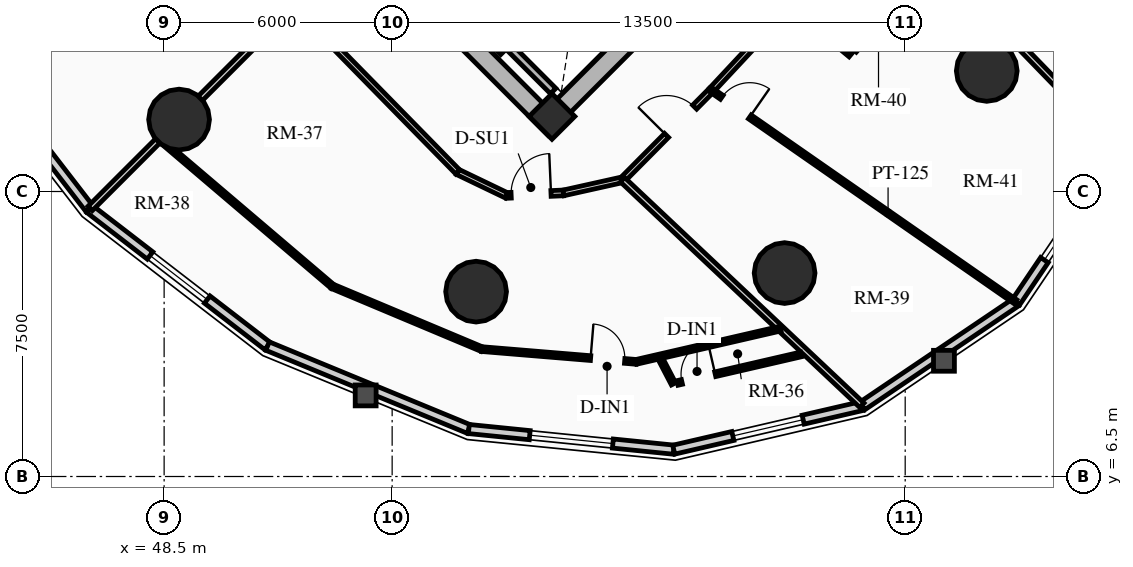
"""IFC4 building model, lengths in metres.
Left out: names, types, materials, properties, quantities, classifications, styles, units other than length and angle.
Written with IfcOpenShell. Run it as: python <this file> out.ifc"""

import sys

from ifc_helpers import new_model, si_unit, direction, frame, frame_2d, origin, origin_2d, place, context, subcontext, project, spatial, rectangle, circle, extrude, source, transform, mapped, element, fill, save


model = new_model("IFC4")
c1 = context("Model", 3, precision=1e-05, world=origin(), true_north=direction((0.0, 1.0)))
c2 = subcontext(c1, "Body", "Model", "MODEL_VIEW")
j1 = project(units=[si_unit("LENGTHUNIT", "METRE"), si_unit("PLANEANGLEUNIT", "RADIAN")], contexts=[c1])
p1 = place(None, origin())
s1 = spatial("IfcSite", under=j1, at=p1, CompositionType="ELEMENT")
p2 = place(p1, origin())
s2 = spatial("IfcBuilding", under=s1, at=p2, CompositionType="ELEMENT")
p3 = place(p2, frame((0.0, 0.0, 42.37)))
s3 = spatial("IfcBuildingStorey", under=s2, at=p3, CompositionType="ELEMENT", Elevation=42.37)
p4 = place(p3, frame((58.773, 15.661, 0.0), z_axis=(0.0, 0.0, 1.0), x_axis=(-0.707106781187, 0.707106781187, 0.0)))
e1 = element("IfcWall", 1, at=p4, inside=s3, PredefinedType="SHEAR", context=c2, shape_type="SweptSolid", body=[
    extrude(rectangle(XDim=14.3, YDim=0.5, at=frame_2d((7.15, 0.0))), origin(), (0.0, 0.0, 1.0), 2.91),
])
p5 = place(p3, frame((58.596, 15.838, 0.0), z_axis=(0.0, 0.0, 1.0), x_axis=(0.707106781187, 0.707106781187, 0.0)))
e2 = element("IfcWall", 2, at=p5, inside=s3, PredefinedType="SHEAR", context=c2, shape_type="SweptSolid", body=[
    extrude(rectangle(XDim=10.7, YDim=0.5, at=frame_2d((5.35, 0.0))), origin(), (0.0, 0.0, 1.0), 2.91),
])
m1 = source(origin(), c2, "Body", "SweptSolid", [
    extrude(rectangle(XDim=1.5, YDim=2.02, at=frame_2d((0.75, 1.01))), frame((0.0, 0.26, 0.0), z_axis=(0.0, -1.0, 0.0), x_axis=(1.0, 0.0, 0.0)), (0.0, 0.0, 1.0), 0.52),
])
p6 = place(p5, frame((5.45, 0.0, 0.0)))
e3 = element("IfcOpeningElement", 3, at=p6, cuts=e2, PredefinedType="OPENING", context=c2, shape_type="MappedRepresentation", body=[
    mapped(m1, transform((0.0, 0.0, 0.0), x_axis=(1.0, 0.0, 0.0), y_axis=(0.0, 1.0, 0.0), z_axis=(0.0, 0.0, 1.0), scale=1.0)),
])
p7 = place(p3, frame((58.706, 15.976, 0.0), z_axis=(0.0, 0.0, 1.0), x_axis=(0.707106781187, 0.707106781187, 0.0)))
e4 = element("IfcColumn", 4, at=p7, inside=s3, PredefinedType="COLUMN", context=c2, shape_type="SweptSolid", body=[
    extrude(rectangle(XDim=0.85, YDim=0.85, at=origin_2d()), origin(), (0.0, 0.0, 1.0), 2.91),
])
for number, where, z_axis, x_axis in (
    (5, (48.893, 15.893, 0.0), (0.0, 0.0, 1.0), (1.0, 0.0, 0.0)),
    (6, (56.709, 11.365, 0.0), (0.0, 0.0, 1.0), (1.0, 0.0, 0.0)),
    (7, (64.827, 11.854, 0.0), (0.0, 0.0, 1.0), (1.0, 0.0, 0.0)),
    (8, (70.146, 17.173, 0.0), (0.0, 0.0, 1.0), (1.0, 0.0, 0.0)),
):
    element("IfcColumn", number, at=place(p3, frame(where, z_axis=z_axis, x_axis=x_axis)), inside=s3, PredefinedType="USERDEFINED", context=c2, shape_type="SweptSolid", body=[
        extrude(circle(Radius=0.8, at=origin_2d()), origin(), (0.0, 0.0, 1.0), 2.91),
    ])
p8 = place(p3, frame((46.541, 13.541, 0.0), z_axis=(0.0, 0.0, 1.0), x_axis=(-0.610494906082, 0.792020182601, 0.0)))
e9 = element("IfcWall", 9, at=p8, inside=s3, PredefinedType="SOLIDWALL", context=c2, shape_type="SweptSolid", body=[
    extrude(rectangle(XDim=5.911, YDim=0.24, at=frame_2d((2.956, 0.0))), origin(), (0.0, 0.0, 1.0), 2.073),
])
p9 = place(p3, frame((51.222, 9.932, 0.0), z_axis=(0.0, 0.0, 1.0), x_axis=(-0.792020182601, 0.610494906082, 0.0)))
e10 = element("IfcWall", 10, at=p9, inside=s3, PredefinedType="SOLIDWALL", context=c2, shape_type="SweptSolid", body=[
    extrude(rectangle(XDim=5.911, YDim=0.24, at=frame_2d((2.956, 0.0))), origin(), (0.0, 0.0, 1.0), 2.073),
])
m2 = source(origin(), c2, "Body", "SweptSolid", [
    extrude(rectangle(XDim=1.9, YDim=1.35, at=frame_2d((0.95, 0.675))), frame((0.0, 0.13, 0.0), z_axis=(0.0, -1.0, 0.0), x_axis=(1.0, 0.0, 0.0)), (0.0, 0.0, 1.0), 0.26),
])
p10 = place(p9, frame((2.005, 0.0, 0.65)))
e11 = element("IfcOpeningElement", 11, at=p10, cuts=e10, PredefinedType="OPENING", context=c2, shape_type="MappedRepresentation", body=[
    mapped(m2, transform((0.0, 0.0, 0.0), x_axis=(1.0, 0.0, 0.0), y_axis=(0.0, 1.0, 0.0), z_axis=(0.0, 0.0, 1.0), scale=1.0)),
])
p11 = place(p3, frame((56.518, 7.749, 0.0), z_axis=(0.0, 0.0, 1.0), x_axis=(-0.924542988536, 0.381077764176, 0.0)))
e12 = element("IfcWall", 12, at=p11, inside=s3, PredefinedType="SOLIDWALL", context=c2, shape_type="SweptSolid", body=[
    extrude(rectangle(XDim=5.728, YDim=0.24, at=frame_2d((2.864, 0.0))), origin(), (0.0, 0.0, 1.0), 2.073),
])
p12 = place(p3, frame((61.91, 7.206, 0.0), z_axis=(0.0, 0.0, 1.0), x_axis=(-0.994968263437, 0.100190592135, 0.0)))
e13 = element("IfcWall", 13, at=p12, inside=s3, PredefinedType="SOLIDWALL", context=c2, shape_type="SweptSolid", body=[
    extrude(rectangle(XDim=5.419, YDim=0.24, at=frame_2d((2.71, 0.0))), origin(), (0.0, 0.0, 1.0), 2.073),
])
m3 = source(origin(), c2, "Body", "SweptSolid", [
    extrude(rectangle(XDim=2.2, YDim=1.35, at=frame_2d((1.1, 0.675))), frame((0.0, 0.13, 0.0), z_axis=(0.0, -1.0, 0.0), x_axis=(1.0, 0.0, 0.0)), (0.0, 0.0, 1.0), 0.26),
])
p13 = place(p12, frame((1.61, 0.0, 0.65)))
e14 = element("IfcOpeningElement", 14, at=p13, cuts=e13, PredefinedType="OPENING", context=c2, shape_type="MappedRepresentation", body=[
    mapped(m3, transform((0.0, 0.0, 0.0), x_axis=(1.0, 0.0, 0.0), y_axis=(0.0, 1.0, 0.0), z_axis=(0.0, 0.0, 1.0), scale=1.0)),
])
p14 = place(p3, frame((66.871, 8.356, 0.0), z_axis=(0.0, 0.0, 1.0), x_axis=(-0.974167686491, -0.22582585901, 0.0)))
e15 = element("IfcWall", 15, at=p14, inside=s3, PredefinedType="SOLIDWALL", context=c2, shape_type="SweptSolid", body=[
    extrude(rectangle(XDim=5.092, YDim=0.24, at=frame_2d((2.546, 0.0))), origin(), (0.0, 0.0, 1.0), 2.073),
])
p15 = place(p14, frame((1.596, 0.0, 0.65)))
e16 = element("IfcOpeningElement", 16, at=p15, cuts=e15, PredefinedType="OPENING", context=c2, shape_type="MappedRepresentation", body=[
    mapped(m2, transform((0.0, 0.0, 0.0), x_axis=(1.0, 0.0, 0.0), y_axis=(0.0, 1.0, 0.0), z_axis=(0.0, 0.0, 1.0), scale=1.0)),
])
p16 = place(p3, frame((70.914, 11.086, 0.0), z_axis=(0.0, 0.0, 1.0), x_axis=(-0.828748297084, -0.559621532896, 0.0)))
e17 = element("IfcWall", 17, at=p16, inside=s3, PredefinedType="SOLIDWALL", context=c2, shape_type="SweptSolid", body=[
    extrude(rectangle(XDim=4.879, YDim=0.24, at=frame_2d((2.439, 0.0))), origin(), (0.0, 0.0, 1.0), 2.073),
])
p17 = place(p3, frame((73.644, 15.129, 0.0), z_axis=(0.0, 0.0, 1.0), x_axis=(-0.559621532896, -0.828748297084, 0.0)))
e18 = element("IfcWall", 18, at=p17, inside=s3, PredefinedType="SOLIDWALL", context=c2, shape_type="SweptSolid", body=[
    extrude(rectangle(XDim=4.879, YDim=0.24, at=frame_2d((2.439, 0.0))), origin(), (0.0, 0.0, 1.0), 2.073),
])
p18 = place(p17, frame((1.339, 0.0, 0.65)))
e19 = element("IfcOpeningElement", 19, at=p18, cuts=e18, PredefinedType="OPENING", context=c2, shape_type="MappedRepresentation", body=[
    mapped(m3, transform((0.0, 0.0, 0.0), x_axis=(1.0, 0.0, 0.0), y_axis=(0.0, 1.0, 0.0), z_axis=(0.0, 0.0, 1.0), scale=1.0)),
])
p19 = place(p3, frame((57.284, 17.673, 0.0), z_axis=(0.0, 0.0, 1.0), x_axis=(0.707147878904, 0.70706568108, 0.0)))
e20 = element("IfcWall", 20, at=p19, inside=s3, PredefinedType="SHEAR", context=c2, shape_type="SweptSolid", body=[
    extrude(rectangle(XDim=2.97, YDim=0.2, at=frame_2d((1.485, 0.0))), origin(), (0.0, 0.0, 1.0), 2.91),
])
p20 = place(p3, frame((58.737, 16.644, 0.0), z_axis=(0.0, 0.0, 1.0), x_axis=(-0.707032117043, 0.707181437447, 0.0)))
e21 = element("IfcWall", 21, at=p20, inside=s3, PredefinedType="SHEAR", context=c2, shape_type="SweptSolid", body=[
    extrude(rectangle(XDim=1.635, YDim=0.2, at=frame_2d((0.817, 0.0))), origin(), (0.0, 0.0, 1.0), 2.91),
])
p21 = place(p3, frame((51.914, 18.914, 0.0), z_axis=(0.0, 0.0, 1.0), x_axis=(0.699999313799, -0.714143515465, 0.0)))
e22 = element("IfcWall", 22, at=p21, inside=s3, PredefinedType="PARTITIONING", context=c2, shape_type="SweptSolid", body=[
    extrude(rectangle(XDim=6.162, YDim=0.15, at=frame_2d((3.081, 0.0))), origin(), (0.0, 0.0, 1.0), 2.159),
])
p22 = place(p3, frame((56.227, 14.513, 0.0), z_axis=(0.0, 0.0, 1.0), x_axis=(0.901477579283, -0.432825801044, 0.0)))
e23 = element("IfcWall", 23, at=p22, inside=s3, PredefinedType="PARTITIONING", context=c2, shape_type="SweptSolid", body=[
    extrude(rectangle(XDim=1.424, YDim=0.15, at=frame_2d((0.712, 0.0))), origin(), (0.0, 0.0, 1.0), 2.205),
])
p23 = place(p3, frame((57.511, 13.897, 0.0), z_axis=(0.0, 0.0, 1.0), x_axis=(0.999024538494, 0.044158481476, 0.0)))
e24 = element("IfcWall", 24, at=p23, inside=s3, PredefinedType="PARTITIONING", context=c2, shape_type="SweptSolid", body=[
    extrude(rectangle(XDim=1.498, YDim=0.15, at=frame_2d((0.749, 0.0))), origin(), (0.0, 0.0, 1.0), 2.159),
])
m4 = source(origin(), c2, "Body", "SweptSolid", [
    extrude(rectangle(XDim=1.05, YDim=2.015, at=frame_2d((0.525, 1.007))), frame((0.0, 0.085, 0.0), z_axis=(0.0, -1.0, 0.0), x_axis=(1.0, 0.0, 0.0)), (0.0, 0.0, 1.0), 0.17),
])
p24 = place(p23, frame((0.12, 0.0, 0.0)))
e25 = element("IfcOpeningElement", 25, at=p24, cuts=e24, PredefinedType="OPENING", context=c2, shape_type="MappedRepresentation", body=[
    mapped(m4, transform((0.0, 0.0, 0.0), x_axis=(1.0, 0.0, 0.0), y_axis=(0.0, 1.0, 0.0), z_axis=(0.0, 0.0, 1.0), scale=1.0)),
])
p25 = place(p3, frame((59.008, 13.963, 0.0), z_axis=(0.0, 0.0, 1.0), x_axis=(0.976020856791, 0.21767702476, 0.0)))
e26 = element("IfcWall", 26, at=p25, inside=s3, PredefinedType="PARTITIONING", context=c2, shape_type="SweptSolid", body=[
    extrude(rectangle(XDim=1.593, YDim=0.15, at=frame_2d((0.796, 0.0))), origin(), (0.0, 0.0, 1.0), 2.205),
])
p26 = place(p3, frame((60.562, 14.31, 0.0), z_axis=(0.0, 0.0, 1.0), x_axis=(0.704566236161, 0.709638230975, 0.0)))
e27 = element("IfcWall", 27, at=p26, inside=s3, PredefinedType="PARTITIONING", context=c2, shape_type="SweptSolid", body=[
    extrude(rectangle(XDim=3.321, YDim=0.15, at=frame_2d((1.661, 0.0))), origin(), (0.0, 0.0, 1.0), 2.159),
])
p27 = place(p26, frame((1.643, 0.0, 0.0)))
e28 = element("IfcOpeningElement", 28, at=p27, cuts=e27, PredefinedType="OPENING", context=c2, shape_type="MappedRepresentation", body=[
    mapped(m4, transform((0.0, 0.0, 0.0), x_axis=(1.0, 0.0, 0.0), y_axis=(0.0, 1.0, 0.0), z_axis=(0.0, 0.0, 1.0), scale=1.0)),
])
p28 = place(p3, frame((62.903, 16.667, 0.0), z_axis=(0.0, 0.0, 1.0), x_axis=(0.682371947497, 0.731005147225, 0.0)))
e29 = element("IfcWall", 29, at=p28, inside=s3, PredefinedType="PARTITIONING", context=c2, shape_type="SweptSolid", body=[
    extrude(rectangle(XDim=6.642, YDim=0.15, at=frame_2d((3.321, 0.0))), origin(), (0.0, 0.0, 1.0), 2.159),
])
p29 = place(p3, frame((51.914, 18.914, 0.0), z_axis=(0.0, 0.0, 1.0), x_axis=(-0.707106781187, -0.707106781187, 0.0)))
e30 = element("IfcWall", 30, at=p29, inside=s3, PredefinedType="PARTITIONING", context=c2, shape_type="SweptSolid", body=[
    extrude(rectangle(XDim=7.579, YDim=0.16, at=frame_2d((3.79, 0.0))), origin(), (0.0, 0.0, 1.0), 2.073),
])
p30 = place(p3, frame((60.562, 14.31, 0.0), z_axis=(0.0, 0.0, 1.0), x_axis=(0.727781661561, -0.685808904211, 0.0)))
e31 = element("IfcWall", 31, at=p30, inside=s3, PredefinedType="PARTITIONING", context=c2, shape_type="SweptSolid", body=[
    extrude(rectangle(XDim=8.655, YDim=0.16, at=frame_2d((4.328, 0.0))), origin(), (0.0, 0.0, 1.0), 2.073),
])
p31 = place(p3, frame((67.435, 21.521, 0.0), z_axis=(0.0, 0.0, 1.0), x_axis=(0.6962628802, -0.717786877601, 0.0)))
e32 = element("IfcWall", 32, at=p31, inside=s3, PredefinedType="PARTITIONING", context=c2, shape_type="SweptSolid", body=[
    extrude(rectangle(XDim=8.893, YDim=0.16, at=frame_2d((4.446, 0.0))), origin(), (0.0, 0.0, 1.0), 2.073),
])
p32 = place(p3, frame((48.377, 15.377, 0.0), z_axis=(0.0, 0.0, 1.0), x_axis=(0.761505943152, -0.648157927163, 0.0)))
e33 = element("IfcWall", 33, at=p32, inside=s3, PredefinedType="PARTITIONING", context=c2, shape_type="SweptSolid", body=[
    extrude(rectangle(XDim=5.979, YDim=0.125, at=frame_2d((2.99, 0.0))), origin(), (0.0, 0.0, 1.0), 2.635),
])
p33 = place(p3, frame((52.93, 11.501, 0.0), z_axis=(0.0, 0.0, 1.0), x_axis=(0.922051248037, -0.387067818338, 0.0)))
e34 = element("IfcWall", 34, at=p33, inside=s3, PredefinedType="PARTITIONING", context=c2, shape_type="SweptSolid", body=[
    extrude(rectangle(XDim=4.26, YDim=0.125, at=frame_2d((2.13, 0.0))), origin(), (0.0, 0.0, 1.0), 2.159),
])
p34 = place(p3, frame((56.858, 9.852, 0.0), z_axis=(0.0, 0.0, 1.0), x_axis=(0.996604967548, -0.082331881181, 0.0)))
e35 = element("IfcWall", 35, at=p34, inside=s3, PredefinedType="PARTITIONING", context=c2, shape_type="SweptSolid", body=[
    extrude(rectangle(XDim=4.077, YDim=0.125, at=frame_2d((2.039, 0.0))), origin(), (0.0, 0.0, 1.0), 2.635),
])
m5 = source(origin(), c2, "Body", "SweptSolid", [
    extrude(rectangle(XDim=0.9, YDim=2.005, at=frame_2d((0.45, 1.002))), frame((0.0, 0.073, 0.0), z_axis=(0.0, -1.0, 0.0), x_axis=(1.0, 0.0, 0.0)), (0.0, 0.0, 1.0), 0.145),
])
p35 = place(p34, frame((2.874, 0.0, 0.0)))
e36 = element("IfcOpeningElement", 36, at=p35, cuts=e35, PredefinedType="OPENING", context=c2, shape_type="MappedRepresentation", body=[
    mapped(m5, transform((0.0, 0.0, 0.0), x_axis=(1.0, 0.0, 0.0), y_axis=(0.0, 1.0, 0.0), z_axis=(0.0, 0.0, 1.0), scale=1.0)),
])
p36 = place(p3, frame((60.921, 9.517, 0.0), z_axis=(0.0, 0.0, 1.0), x_axis=(0.974453436038, 0.224589627973, 0.0)))
e37 = element("IfcWall", 37, at=p36, inside=s3, PredefinedType="PARTITIONING", context=c2, shape_type="SweptSolid", body=[
    extrude(rectangle(XDim=3.898, YDim=0.125, at=frame_2d((1.949, 0.0))), origin(), (0.0, 0.0, 1.0), 2.205),
])
p37 = place(p3, frame((61.564, 9.589, 0.0), z_axis=(0.0, 0.0, 1.0), x_axis=(0.462168536246, -0.886792108729, 0.0)))
e38 = element("IfcWall", 38, at=p37, inside=s3, PredefinedType="PARTITIONING", context=c2, shape_type="SweptSolid", body=[
    extrude(rectangle(XDim=0.735, YDim=0.125, at=frame_2d((0.367, 0.0))), origin(), (0.0, 0.0, 1.0), 2.635),
])
p38 = place(p3, frame((62.008, 8.962, 0.0), z_axis=(0.0, 0.0, 1.0), x_axis=(0.974365294983, 0.224971713626, 0.0)))
e39 = element("IfcWall", 39, at=p38, inside=s3, PredefinedType="PARTITIONING", context=c2, shape_type="SweptSolid", body=[
    extrude(rectangle(XDim=3.337, YDim=0.125, at=frame_2d((1.668, 0.0))), origin(), (0.0, 0.0, 1.0), 2.635),
])
p39 = place(p38, frame((0.12, 0.0, 0.0)))
e40 = element("IfcOpeningElement", 40, at=p39, cuts=e39, PredefinedType="OPENING", context=c2, shape_type="MappedRepresentation", body=[
    mapped(m5, transform((0.0, 0.0, 0.0), x_axis=(1.0, 0.0, 0.0), y_axis=(0.0, 1.0, 0.0), z_axis=(0.0, 0.0, 1.0), scale=1.0)),
])
p40 = place(p3, frame((62.903, 16.667, 0.0), z_axis=(0.0, 0.0, 1.0), x_axis=(0.820761665638, -0.571270766116, 0.0)))
e41 = element("IfcWall", 41, at=p40, inside=s3, PredefinedType="PARTITIONING", context=c2, shape_type="SweptSolid", body=[
    extrude(rectangle(XDim=9.743, YDim=0.125, at=frame_2d((4.872, 0.0))), origin(), (0.0, 0.0, 1.0), 2.073),
])
p41 = place(p40, frame((0.33, 0.0, 0.0)))
e42 = element("IfcOpeningElement", 42, at=p41, cuts=e41, PredefinedType="OPENING", context=c2, shape_type="MappedRepresentation", body=[
    mapped(m5, transform((0.0, 0.0, 0.0), x_axis=(1.0, 0.0, 0.0), y_axis=(0.0, 1.0, 0.0), z_axis=(0.0, 0.0, 1.0), scale=1.0)),
])
p42 = place(p3, frame((65.202, 18.721, 0.0), z_axis=(0.0, 0.0, 1.0), x_axis=(0.769814202386, -0.638268042287, 0.0)))
e43 = element("IfcWall", 43, at=p42, inside=s3, PredefinedType="PARTITIONING", context=c2, shape_type="SweptSolid", body=[
    extrude(rectangle(XDim=1.769, YDim=0.125, at=frame_2d((0.884, 0.0))), origin(), (0.0, 0.0, 1.0), 2.635),
])
m6 = source(origin(), c2, "Body", "SweptSolid", [
    extrude(rectangle(XDim=1.9, YDim=1.35, at=frame_2d((0.95, 0.675))), frame((0.0, 0.03, 0.0), z_axis=(0.0, -1.0, 0.0), x_axis=(1.0, 0.0, 0.0)), (0.0, 0.0, 1.0), 0.06),
])
p43 = place(p10, origin())
e44 = element("IfcWindow", 44, at=p43, inside=s3, PartitioningType="DOUBLE_PANEL_VERTICAL", PredefinedType="WINDOW", context=c2, shape_type="MappedRepresentation", body=[
    mapped(m6, transform((0.0, 0.0, 0.0), x_axis=(1.0, 0.0, 0.0), y_axis=(0.0, 1.0, 0.0), z_axis=(0.0, 0.0, 1.0), scale=1.0)),
])
fill(e11, e44)
m7 = source(origin(), c2, "Body", "SweptSolid", [
    extrude(rectangle(XDim=2.2, YDim=1.35, at=frame_2d((1.1, 0.675))), frame((0.0, 0.03, 0.0), z_axis=(0.0, -1.0, 0.0), x_axis=(1.0, 0.0, 0.0)), (0.0, 0.0, 1.0), 0.06),
])
p44 = place(p13, origin())
e45 = element("IfcWindow", 45, at=p44, inside=s3, PartitioningType="DOUBLE_PANEL_VERTICAL", PredefinedType="WINDOW", context=c2, shape_type="MappedRepresentation", body=[
    mapped(m7, transform((0.0, 0.0, 0.0), x_axis=(1.0, 0.0, 0.0), y_axis=(0.0, 1.0, 0.0), z_axis=(0.0, 0.0, 1.0), scale=1.0)),
])
fill(e14, e45)
p45 = place(p15, origin())
e46 = element("IfcWindow", 46, at=p45, inside=s3, PartitioningType="DOUBLE_PANEL_VERTICAL", PredefinedType="WINDOW", context=c2, shape_type="MappedRepresentation", body=[
    mapped(m6, transform((0.0, 0.0, 0.0), x_axis=(1.0, 0.0, 0.0), y_axis=(0.0, 1.0, 0.0), z_axis=(0.0, 0.0, 1.0), scale=1.0)),
])
fill(e16, e46)
p46 = place(p18, origin())
e47 = element("IfcWindow", 47, at=p46, inside=s3, PartitioningType="DOUBLE_PANEL_VERTICAL", PredefinedType="WINDOW", context=c2, shape_type="MappedRepresentation", body=[
    mapped(m7, transform((0.0, 0.0, 0.0), x_axis=(1.0, 0.0, 0.0), y_axis=(0.0, 1.0, 0.0), z_axis=(0.0, 0.0, 1.0), scale=1.0)),
])
fill(e19, e47)
m8 = source(origin(), c2, "Body", "SweptSolid", [
    extrude(rectangle(XDim=1.05, YDim=2.015, at=frame_2d((0.525, 1.007))), frame((0.0, 0.025, 0.0), z_axis=(0.0, -1.0, 0.0), x_axis=(1.0, 0.0, 0.0)), (0.0, 0.0, 1.0), 0.05),
])
p47 = place(p24, origin())
e48 = element("IfcDoor", 48, at=p47, inside=s3, OperationType="SINGLE_SWING_RIGHT", PredefinedType="DOOR", context=c2, shape_type="MappedRepresentation", body=[
    mapped(m8, transform((0.0, 0.0, 0.0), x_axis=(1.0, 0.0, 0.0), y_axis=(0.0, 1.0, 0.0), z_axis=(0.0, 0.0, 1.0), scale=1.0)),
])
fill(e25, e48)
m9 = source(origin(), c2, "Body", "SweptSolid", [
    extrude(rectangle(XDim=0.9, YDim=2.005, at=frame_2d((0.45, 1.002))), frame((0.0, 0.025, 0.0), z_axis=(0.0, -1.0, 0.0), x_axis=(1.0, 0.0, 0.0)), (0.0, 0.0, 1.0), 0.05),
])
p48 = place(p35, origin())
e49 = element("IfcDoor", 49, at=p48, inside=s3, OperationType="SINGLE_SWING_LEFT", PredefinedType="DOOR", context=c2, shape_type="MappedRepresentation", body=[
    mapped(m9, transform((0.0, 0.0, 0.0), x_axis=(1.0, 0.0, 0.0), y_axis=(0.0, 1.0, 0.0), z_axis=(0.0, 0.0, 1.0), scale=1.0)),
])
fill(e36, e49)
p49 = place(p39, origin())
e50 = element("IfcDoor", 50, at=p49, inside=s3, OperationType="SINGLE_SWING_RIGHT", PredefinedType="DOOR", context=c2, shape_type="MappedRepresentation", body=[
    mapped(m9, transform((0.0, 0.0, 0.0), x_axis=(1.0, 0.0, 0.0), y_axis=(0.0, 1.0, 0.0), z_axis=(0.0, 0.0, 1.0), scale=1.0)),
])
fill(e40, e50)
p50 = place(p27, origin())
e51 = element("IfcDoor", 51, at=p50, inside=s3, OperationType="SINGLE_SWING_LEFT", PredefinedType="DOOR", context=c2, shape_type="MappedRepresentation", body=[
    mapped(m8, transform((0.0, 0.0, 0.0), x_axis=(1.0, 0.0, 0.0), y_axis=(0.0, 1.0, 0.0), z_axis=(0.0, 0.0, 1.0), scale=1.0)),
])
fill(e28, e51)
p51 = place(p41, origin())
e52 = element("IfcDoor", 52, at=p51, inside=s3, OperationType="SINGLE_SWING_RIGHT", PredefinedType="DOOR", context=c2, shape_type="MappedRepresentation", body=[
    mapped(m9, transform((0.0, 0.0, 0.0), x_axis=(1.0, 0.0, 0.0), y_axis=(0.0, 1.0, 0.0), z_axis=(0.0, 0.0, 1.0), scale=1.0)),
])
fill(e42, e52)
save(model, sys.argv[1])
